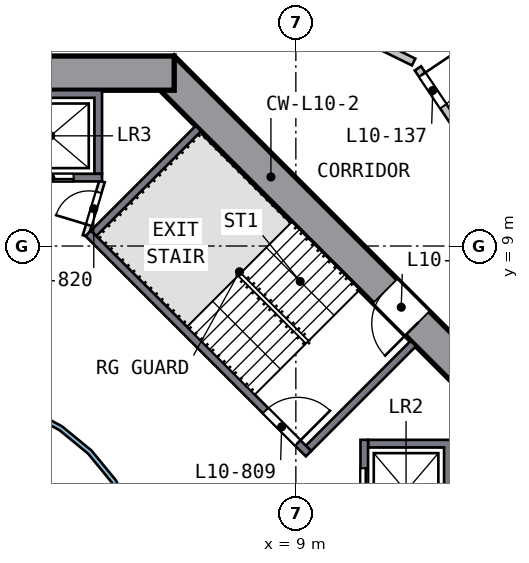
"""IFC4 building model, lengths in metres.
Left out: names, types, materials, properties, quantities, classifications, styles, units other than length and angle.
Written with IfcOpenShell. Run it as: python <this file> out.ifc"""

import sys

from ifc_helpers import new_model, si_unit, direction, frame, frame_2d, origin, place, context, subcontext, project, spatial, polyline, rectangle, outline, extrude, element, fill, save


model = new_model("IFC4")
c1 = context("Model", 3, precision=1e-05, world=origin(), true_north=direction((0.0, 1.0)))
c2 = subcontext(c1, "Body", "Model", "MODEL_VIEW")
j1 = project(units=[si_unit("LENGTHUNIT", "METRE"), si_unit("PLANEANGLEUNIT", "RADIAN")], contexts=[c1])
p1 = place(None, origin())
s1 = spatial("IfcSite", under=j1, at=p1, CompositionType="ELEMENT")
p2 = place(p1, origin())
s2 = spatial("IfcBuilding", under=s1, at=p2, CompositionType="ELEMENT")
p3 = place(p2, frame((0.0, 0.0, 49.5)))
s3 = spatial("IfcBuildingStorey", under=s2, at=p3, CompositionType="ELEMENT", Elevation=49.5)
p4 = place(p3, frame((13.682, 5.481, 0.0), z_axis=(0.0, 0.0, 1.0), x_axis=(-0.707106781, 0.707106781, 0.0)))
e1 = element("IfcWall", 1, at=p4, inside=s3, PredefinedType="SHEAR", context=c2, shape_type="SweptSolid", body=[
    extrude(rectangle(XDim=11.598, YDim=0.9, at=frame_2d((5.799, 0.0))), origin(), (0.0, 0.0, 1.0), 3.5),
])
p5 = place(p4, frame((2.099, 0.0, 0.0)))
e2 = element("IfcOpeningElement", 2, at=p5, cuts=e1, PredefinedType="OPENING", context=c2, shape_type="SweptSolid", body=[
    extrude(rectangle(XDim=1.2, YDim=2.1, at=frame_2d((0.6, 1.05))), frame((0.0, 0.46, 0.0), z_axis=(0.0, -1.0, 0.0), x_axis=(1.0, 0.0, 0.0)), (0.0, 0.0, 1.0), 0.92),
])
p6 = place(p3, frame((5.799, 13.55, 0.0), z_axis=(0.0, 0.0, 1.0), x_axis=(-1.0, 0.0, 0.0)))
e3 = element("IfcWall", 3, at=p6, inside=s3, PredefinedType="SHEAR", context=c2, shape_type="SweptSolid", body=[
    extrude(rectangle(XDim=11.598, YDim=0.9, at=frame_2d((5.799, 0.0))), origin(), (0.0, 0.0, 1.0), 3.5),
])
p7 = place(p6, frame((4.899, 0.0, 0.0)))
e4 = element("IfcOpeningElement", 4, at=p7, cuts=e3, PredefinedType="OPENING", context=c2, shape_type="SweptSolid", body=[
    extrude(rectangle(XDim=1.8, YDim=2.1, at=frame_2d((0.9, 1.05))), frame((0.0, 0.46, 0.0), z_axis=(0.0, -1.0, 0.0), x_axis=(1.0, 0.0, 0.0)), (0.0, 0.0, 1.0), 0.92),
])
p8 = place(p3, origin())
e5 = element("IfcWall", 5, at=p8, inside=s3, PredefinedType="SOLIDWALL", context=c2, shape_type="SweptSolid", body=[
    extrude(outline(polyline([(13.1, 3.9), (13.1, 1.2), (10.9, 1.2), (10.9, 1.4), (12.9, 1.4), (12.9, 3.7), (10.9, 3.7), (10.9, 3.9), (13.1, 3.9)])), origin(), (0.0, 0.0, 1.0), 3.19),
])
p9 = place(p3, frame((10.8, 1.2, 0.0), z_axis=(0.0, 0.0, 1.0), x_axis=(0.0, 1.0, 0.0)))
e6 = element("IfcWall", 6, at=p9, inside=s3, PredefinedType="SOLIDWALL", context=c2, shape_type="SweptSolid", body=[
    extrude(rectangle(XDim=2.7, YDim=0.2, at=frame_2d((1.35, 0.0))), origin(), (0.0, 0.0, 1.0), 3.19),
])
p10 = place(p9, frame((0.75, 0.0, 0.0)))
e7 = element("IfcOpeningElement", 7, at=p10, cuts=e6, PredefinedType="OPENING", context=c2, shape_type="SweptSolid", body=[
    extrude(rectangle(XDim=1.2, YDim=2.1, at=frame_2d((0.6, 1.05))), frame((0.0, 0.11, 0.0), z_axis=(0.0, -1.0, 0.0), x_axis=(1.0, 0.0, 0.0)), (0.0, 0.0, 1.0), 0.22),
])
p11 = place(p3, origin())
e8 = element("IfcWall", 8, at=p11, inside=s3, PredefinedType="SOLIDWALL", context=c2, shape_type="SweptSolid", body=[
    extrude(outline(polyline([(3.9, 13.1), (3.9, 10.9), (3.7, 10.9), (3.7, 12.9), (1.4, 12.9), (1.4, 10.9), (1.2, 10.9), (1.2, 13.1), (3.9, 13.1)])), origin(), (0.0, 0.0, 1.0), 3.19),
])
p12 = place(p3, frame((1.2, 10.8, 0.0), z_axis=(0.0, 0.0, 1.0), x_axis=(1.0, 0.0, 0.0)))
e9 = element("IfcWall", 9, at=p12, inside=s3, PredefinedType="SOLIDWALL", context=c2, shape_type="SweptSolid", body=[
    extrude(rectangle(XDim=2.7, YDim=0.2, at=frame_2d((1.35, 0.0))), origin(), (0.0, 0.0, 1.0), 3.19),
])
p13 = place(p12, frame((0.75, 0.0, 0.0)))
e10 = element("IfcOpeningElement", 10, at=p13, cuts=e9, PredefinedType="OPENING", context=c2, shape_type="SweptSolid", body=[
    extrude(rectangle(XDim=1.2, YDim=2.1, at=frame_2d((0.6, 1.05))), frame((0.0, 0.11, 0.0), z_axis=(0.0, -1.0, 0.0), x_axis=(1.0, 0.0, 0.0)), (0.0, 0.0, 1.0), 0.22),
])
p14 = place(p3, frame((3.535, 9.334, 0.0), z_axis=(0.0, 0.0, 1.0), x_axis=(0.707106781, -0.707106781, 0.0)))
e11 = element("IfcWall", 11, at=p14, inside=s3, PredefinedType="SOLIDWALL", context=c2, shape_type="SweptSolid", body=[
    extrude(rectangle(XDim=8.2, YDim=0.2, at=frame_2d((4.1, 0.0))), origin(), (0.0, 0.0, 1.0), 3.19),
])
p15 = place(p14, frame((6.6, 0.0, 0.0)))
e12 = element("IfcOpeningElement", 12, at=p15, cuts=e11, PredefinedType="OPENING", context=c2, shape_type="SweptSolid", body=[
    extrude(rectangle(XDim=1.2, YDim=2.1, at=frame_2d((0.6, 1.05))), frame((0.0, 0.11, 0.0), z_axis=(0.0, -1.0, 0.0), x_axis=(1.0, 0.0, 0.0)), (0.0, 0.0, 1.0), 0.22),
])
for number, where, z_axis, x_axis in (
    (13, (9.334, 3.677, 0.0), (0.0, 0.0, 1.0), (0.707, 0.707, 0.0)),
    (14, (3.677, 9.334, 0.0), (0.0, 0.0, 1.0), (0.707, 0.707, 0.0)),
):
    element("IfcWall", number, at=place(p3, frame(where, z_axis=z_axis, x_axis=x_axis)), inside=s3, PredefinedType="SOLIDWALL", context=c2, shape_type="SweptSolid", body=[
        extrude(rectangle(XDim=3.9, YDim=0.2, at=frame_2d((1.95, 0.0))), origin(), (0.0, 0.0, 1.0), 3.19),
    ])
p16 = place(p3, frame((3.465, 9.263, 0.0), z_axis=(0.0, 0.0, 1.0), x_axis=(0.289808785, 0.957084567, 0.0)))
e15 = element("IfcWall", 15, at=p16, inside=s3, PredefinedType="PARTITIONING", context=c2, shape_type="SweptSolid", body=[
    extrude(rectangle(XDim=1.501, YDim=0.15, at=frame_2d((0.75, 0.0))), origin(), (0.0, 0.0, 1.0), 3.19),
])
p17 = place(p16, frame((0.301, 0.0, 0.0)))
e16 = element("IfcOpeningElement", 16, at=p17, cuts=e15, PredefinedType="OPENING", context=c2, shape_type="SweptSolid", body=[
    extrude(rectangle(XDim=0.9, YDim=2.1, at=frame_2d((0.45, 1.05))), frame((0.0, 0.085, 0.0), z_axis=(0.0, -1.0, 0.0), x_axis=(1.0, 0.0, 0.0)), (0.0, 0.0, 1.0), 0.17),
])
p18 = place(p3, origin())
e17 = element("IfcWall", 17, at=p18, inside=s3, PredefinedType="SOLIDWALL", context=c2, shape_type="SweptSolid", body=[
    extrude(outline(polyline([(5.021, -0.999), (4.73, -1.959), (4.257, -2.844), (3.62, -3.62), (2.844, -4.257), (1.959, -4.73), (0.999, -5.021), (0.0, -5.12), (-0.999, -5.021), (-1.959, -4.73), (-2.844, -4.257), (-3.62, -3.62), (-4.257, -2.844), (-4.73, -1.959), (-5.021, -0.999), (-5.12, 0.0), (-5.021, 0.999), (-4.73, 1.959), (-4.257, 2.844), (-3.62, 3.62), (-2.844, 4.257), (-1.959, 4.73), (-0.999, 5.021), (0.0, 5.12), (0.999, 5.021), (1.959, 4.73), (2.844, 4.257), (3.62, 3.62), (4.257, 2.844), (4.73, 1.959), (5.021, 0.999), (5.12, 0.0), (5.021, -0.999)]), holes=[polyline([(4.904, 0.976), (4.619, 1.913), (4.157, 2.778), (3.535, 3.535), (2.778, 4.157), (1.913, 4.619), (0.976, 4.904), (0.0, 5.0), (-0.976, 4.904), (-1.913, 4.619), (-2.778, 4.157), (-3.535, 3.535), (-4.157, 2.778), (-4.619, 1.913), (-4.904, 0.976), (-5.0, 0.0), (-4.904, -0.976), (-4.619, -1.913), (-4.157, -2.778), (-3.535, -3.535), (-2.778, -4.157), (-1.913, -4.619), (-0.976, -4.904), (0.0, -5.0), (0.976, -4.904), (1.913, -4.619), (2.778, -4.157), (3.535, -3.535), (4.157, -2.778), (4.619, -1.913), (4.904, -0.976), (5.0, 0.0), (4.904, 0.976)])]), origin(), (0.0, 0.0, 1.0), 3.19),
])
p19 = place(p3, frame((12.1, 13.842, 0.0), z_axis=(0.0, 0.0, 1.0), x_axis=(-0.897570713, 0.44087052, 0.0)))
e18 = element("IfcWall", 18, at=p19, inside=s3, PredefinedType="SOLIDWALL", context=c2, shape_type="SweptSolid", body=[
    extrude(rectangle(XDim=9.516, YDim=0.2, at=frame_2d((4.758, 0.0))), origin(), (0.0, 0.0, 1.0), 3.19),
])
p20 = place(p3, frame((12.212, 13.675, 0.0), z_axis=(0.0, 0.0, 1.0), x_axis=(0.556867612, -0.830601266, 0.0)))
e19 = element("IfcWall", 19, at=p20, inside=s3, PredefinedType="SOLIDWALL", context=c2, shape_type="SweptSolid", body=[
    extrude(rectangle(XDim=9.116, YDim=0.2, at=frame_2d((4.558, 0.0))), origin(), (0.0, 0.0, 1.0), 3.19),
])
p21 = place(p20, frame((0.2, 0.0, 0.0)))
e20 = element("IfcOpeningElement", 20, at=p21, cuts=e19, PredefinedType="OPENING", context=c2, shape_type="SweptSolid", body=[
    extrude(rectangle(XDim=1.0, YDim=2.1, at=frame_2d((0.5, 1.05))), frame((0.0, 0.11, 0.0), z_axis=(0.0, -1.0, 0.0), x_axis=(1.0, 0.0, 0.0)), (0.0, 0.0, 1.0), 0.22),
])
p22 = place(p10, origin())
e21 = element("IfcDoor", 21, at=p22, inside=s3, OperationType="DOUBLE_DOOR_SLIDING", PredefinedType="DOOR", context=c2, shape_type="SweptSolid", body=[
    extrude(rectangle(XDim=1.2, YDim=2.1, at=frame_2d((0.6, 1.05))), frame((0.0, 0.025, 0.0), z_axis=(0.0, -1.0, 0.0), x_axis=(1.0, 0.0, 0.0)), (0.0, 0.0, 1.0), 0.05),
])
fill(e7, e21)
p23 = place(p13, origin())
e22 = element("IfcDoor", 22, at=p23, inside=s3, OperationType="DOUBLE_DOOR_SLIDING", PredefinedType="DOOR", context=c2, shape_type="SweptSolid", body=[
    extrude(rectangle(XDim=1.2, YDim=2.1, at=frame_2d((0.6, 1.05))), frame((0.0, 0.025, 0.0), z_axis=(0.0, -1.0, 0.0), x_axis=(1.0, 0.0, 0.0)), (0.0, 0.0, 1.0), 0.05),
])
fill(e10, e22)
p24 = place(p15, origin())
e23 = element("IfcDoor", 23, at=p24, inside=s3, OperationType="SINGLE_SWING_RIGHT", PredefinedType="DOOR", context=c2, shape_type="SweptSolid", body=[
    extrude(rectangle(XDim=1.2, YDim=2.1, at=frame_2d((0.6, 1.05))), frame((0.0, 0.025, 0.0), z_axis=(0.0, -1.0, 0.0), x_axis=(1.0, 0.0, 0.0)), (0.0, 0.0, 1.0), 0.05),
])
fill(e12, e23)
p25 = place(p5, origin())
e24 = element("IfcDoor", 24, at=p25, inside=s3, OperationType="SINGLE_SWING_LEFT", PredefinedType="DOOR", context=c2, shape_type="SweptSolid", body=[
    extrude(rectangle(XDim=1.2, YDim=2.1, at=frame_2d((0.6, 1.05))), frame((0.0, 0.025, 0.0), z_axis=(0.0, -1.0, 0.0), x_axis=(1.0, 0.0, 0.0)), (0.0, 0.0, 1.0), 0.05),
])
fill(e2, e24)
p26 = place(p17, origin())
e25 = element("IfcDoor", 25, at=p26, inside=s3, OperationType="SINGLE_SWING_LEFT", PredefinedType="DOOR", context=c2, shape_type="SweptSolid", body=[
    extrude(rectangle(XDim=0.9, YDim=2.1, at=frame_2d((0.45, 1.05))), frame((0.0, 0.025, 0.0), z_axis=(0.0, -1.0, 0.0), x_axis=(1.0, 0.0, 0.0)), (0.0, 0.0, 1.0), 0.05),
])
fill(e16, e25)
p27 = place(p21, origin())
e26 = element("IfcDoor", 26, at=p27, inside=s3, OperationType="SINGLE_SWING_LEFT", PredefinedType="DOOR", context=c2, shape_type="SweptSolid", body=[
    extrude(rectangle(XDim=1.0, YDim=2.1, at=frame_2d((0.5, 1.05))), frame((0.0, 0.025, 0.0), z_axis=(0.0, -1.0, 0.0), x_axis=(1.0, 0.0, 0.0)), (0.0, 0.0, 1.0), 0.05),
])
fill(e20, e26)
save(model, sys.argv[1])
